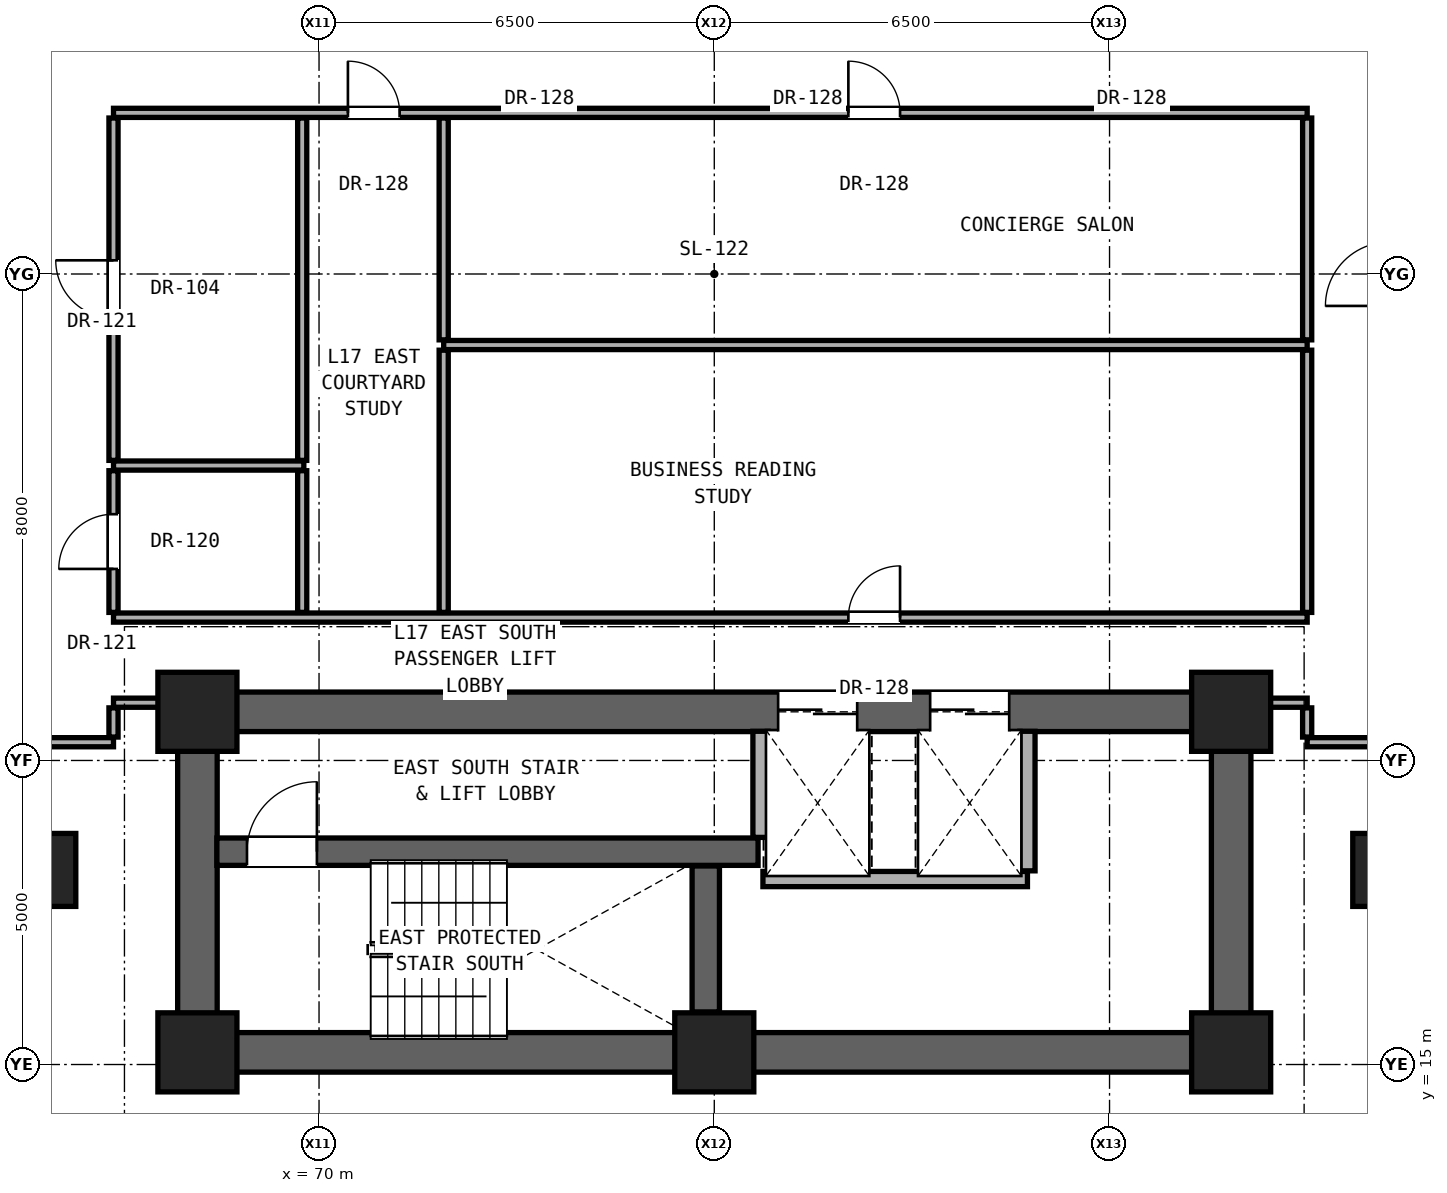
"""IFC4 building model, lengths in metres.
Left out: names, types, materials, properties, quantities, classifications, styles, units other than length and angle.
Written with IfcOpenShell. Run it as: python <this file> out.ifc"""

import sys

from ifc_helpers import new_model, si_unit, direction, frame, frame_2d, origin, origin_2d, place, context, subcontext, project, spatial, rectangle, extrude, element, fill, save


model = new_model("IFC4")
c1 = context("Model", 3, precision=1e-05, world=origin(), true_north=direction((0.0, 1.0)))
c2 = subcontext(c1, "Body", "Model", "MODEL_VIEW")
j1 = project(units=[si_unit("LENGTHUNIT", "METRE"), si_unit("PLANEANGLEUNIT", "RADIAN")], contexts=[c1])
p1 = place(None, origin())
s1 = spatial("IfcSite", under=j1, at=p1, CompositionType="ELEMENT")
p2 = place(p1, origin())
s2 = spatial("IfcBuilding", under=s1, at=p2, CompositionType="ELEMENT")
p3 = place(p2, frame((0.0, 0.0, 62.0)))
s3 = spatial("IfcBuildingStorey", under=s2, at=p3, CompositionType="ELEMENT", Elevation=62.0)
for number, where, z_axis, x_axis in (
    (1, (68.0, 15.2, 0.0), (0.0, 0.0, 1.0), (1.0, 0.0, 0.0)),
    (2, (76.5, 15.2, 0.0), (0.0, 0.0, 1.0), (1.0, 0.0, 0.0)),
    (3, (85.0, 15.2, 0.0), (0.0, 0.0, 1.0), (1.0, 0.0, 0.0)),
    (4, (68.0, 20.8, 0.0), (0.0, 0.0, 1.0), (1.0, 0.0, 0.0)),
    (5, (85.0, 20.8, 0.0), (0.0, 0.0, 1.0), (1.0, 0.0, 0.0)),
):
    element("IfcColumn", number, at=place(p3, frame(where, z_axis=z_axis, x_axis=x_axis)), inside=s3, PredefinedType="COLUMN", context=c2, shape_type="SweptSolid", body=[
        extrude(rectangle(XDim=1.3, YDim=1.3, at=origin_2d()), origin(), (0.0, 0.0, 1.0), 3.3),
    ])
for number, where, z_axis, x_axis in (
    (6, (65.6, 18.2, 0.0), (0.0, 0.0, 1.0), (1.0, 0.0, 0.0)),
    (7, (87.4, 18.2, 0.0), (0.0, 0.0, 1.0), (1.0, 0.0, 0.0)),
):
    element("IfcColumn", number, at=place(p3, frame(where, z_axis=z_axis, x_axis=x_axis)), inside=s3, PredefinedType="PILASTER", context=c2, shape_type="SweptSolid", body=[
        extrude(rectangle(XDim=0.8, YDim=1.2, at=origin_2d()), origin(), (0.0, 0.0, 1.0), 3.3),
    ])
p4 = place(p3, frame((68.0, 15.2, 0.0), z_axis=(0.0, 0.0, 1.0), x_axis=(1.0, 0.0, 0.0)))
e8 = element("IfcWall", 8, at=p4, inside=s3, PredefinedType="SHEAR", context=c2, shape_type="SweptSolid", body=[
    extrude(rectangle(XDim=17.0, YDim=0.65, at=frame_2d((8.5, 0.0))), origin(), (0.0, 0.0, 1.0), 3.06),
])
for number, where, z_axis, x_axis in (
    (9, (68.0, 15.2, 0.0), (0.0, 0.0, 1.0), (0.0, 1.0, 0.0)),
    (10, (85.0, 15.2, 0.0), (0.0, 0.0, 1.0), (0.0, 1.0, 0.0)),
):
    element("IfcWall", number, at=place(p3, frame(where, z_axis=z_axis, x_axis=x_axis)), inside=s3, PredefinedType="SHEAR", context=c2, shape_type="SweptSolid", body=[
        extrude(rectangle(XDim=5.6, YDim=0.65, at=frame_2d((2.8, 0.0))), origin(), (0.0, 0.0, 1.0), 3.06),
    ])
p5 = place(p3, frame((68.0, 20.8, 0.0), z_axis=(0.0, 0.0, 1.0), x_axis=(1.0, 0.0, 0.0)))
e11 = element("IfcWall", 11, at=p5, inside=s3, PredefinedType="SHEAR", context=c2, shape_type="SweptSolid", body=[
    extrude(rectangle(XDim=17.0, YDim=0.65, at=frame_2d((8.5, 0.0))), origin(), (0.0, 0.0, 1.0), 3.06),
])
p6 = place(p5, frame((9.55, 0.0, 0.0)))
e12 = element("IfcOpeningElement", 12, at=p6, cuts=e11, PredefinedType="OPENING", context=c2, shape_type="SweptSolid", body=[
    extrude(rectangle(XDim=1.3, YDim=2.3, at=frame_2d((0.65, 1.15))), frame((0.0, 0.335, 0.0), z_axis=(0.0, -1.0, 0.0), x_axis=(1.0, 0.0, 0.0)), (0.0, 0.0, 1.0), 0.67),
])
p7 = place(p5, frame((12.05, 0.0, 0.0)))
e13 = element("IfcOpeningElement", 13, at=p7, cuts=e11, PredefinedType="OPENING", context=c2, shape_type="SweptSolid", body=[
    extrude(rectangle(XDim=1.3, YDim=2.3, at=frame_2d((0.65, 1.15))), frame((0.0, 0.335, 0.0), z_axis=(0.0, -1.0, 0.0), x_axis=(1.0, 0.0, 0.0)), (0.0, 0.0, 1.0), 0.67),
])
p8 = place(p3, frame((77.3, 18.05, 0.0), z_axis=(0.0, 0.0, 1.0), x_axis=(1.0, 0.0, 0.0)))
e14 = element("IfcWall", 14, at=p8, inside=s3, PredefinedType="SOLIDWALL", context=c2, shape_type="SweptSolid", body=[
    extrude(rectangle(XDim=4.35, YDim=0.25, at=frame_2d((2.175, 0.0))), origin(), (0.0, 0.0, 1.0), 3.06),
])
p9 = place(p3, frame((68.32, 18.5, 0.0), z_axis=(0.0, 0.0, 1.0), x_axis=(1.0, 0.0, 0.0)))
e15 = element("IfcWall", 15, at=p9, inside=s3, PredefinedType="SHEAR", context=c2, shape_type="SweptSolid", body=[
    extrude(rectangle(XDim=8.9, YDim=0.45, at=frame_2d((4.45, 0.0))), origin(), (0.0, 0.0, 1.0), 3.06),
])
p10 = place(p9, frame((0.495, 0.0, 0.0)))
e16 = element("IfcOpeningElement", 16, at=p10, cuts=e15, PredefinedType="OPENING", context=c2, shape_type="SweptSolid", body=[
    extrude(rectangle(XDim=1.15, YDim=2.2, at=frame_2d((0.575, 1.1))), frame((0.0, 0.235, 0.0), z_axis=(0.0, -1.0, 0.0), x_axis=(1.0, 0.0, 0.0)), (0.0, 0.0, 1.0), 0.47),
])
p11 = place(p3, frame((65.25, 20.3, 0.0), z_axis=(0.0, 0.0, 1.0), x_axis=(1.0, 0.0, 0.0)))
e17 = element("IfcWall", 17, at=p11, inside=s3, PredefinedType="PARTITIONING", context=c2, shape_type="SweptSolid", body=[
    extrude(rectangle(XDim=1.37, YDim=0.15, at=frame_2d((0.685, 0.0))), origin(), (0.0, 0.0, 1.0), 3.06),
])
p12 = place(p3, frame((86.25, 20.3, 0.0), z_axis=(0.0, 0.0, 1.0), x_axis=(1.0, 0.0, 0.0)))
e18 = element("IfcWall", 18, at=p12, inside=s3, PredefinedType="PARTITIONING", context=c2, shape_type="SweptSolid", body=[
    extrude(rectangle(XDim=1.35, YDim=0.15, at=frame_2d((0.675, 0.0))), origin(), (0.0, 0.0, 1.0), 3.06),
])
p13 = place(p3, frame((66.62, 20.95, 0.0), z_axis=(0.0, 0.0, 1.0), x_axis=(1.0, 0.0, 0.0)))
e19 = element("IfcWall", 19, at=p13, inside=s3, PredefinedType="PARTITIONING", context=c2, shape_type="SweptSolid", body=[
    extrude(rectangle(XDim=1.06, YDim=0.15, at=frame_2d((0.53, 0.0))), origin(), (0.0, 0.0, 1.0), 2.452),
])
p14 = place(p3, frame((85.32, 20.95, 0.0), z_axis=(0.0, 0.0, 1.0), x_axis=(1.0, 0.0, 0.0)))
e20 = element("IfcWall", 20, at=p14, inside=s3, PredefinedType="PARTITIONING", context=c2, shape_type="SweptSolid", body=[
    extrude(rectangle(XDim=0.93, YDim=0.15, at=frame_2d((0.465, 0.0))), origin(), (0.0, 0.0, 1.0), 2.452),
])
p15 = place(p3, frame((66.62, 22.35, 0.0), z_axis=(0.0, 0.0, 1.0), x_axis=(1.0, 0.0, 0.0)))
e21 = element("IfcWall", 21, at=p15, inside=s3, PredefinedType="PARTITIONING", context=c2, shape_type="SweptSolid", body=[
    extrude(rectangle(XDim=19.63, YDim=0.15, at=frame_2d((9.815, 0.0))), origin(), (0.0, 0.0, 1.0), 2.125),
])
p16 = place(p15, frame((12.085, 0.0, 0.0)))
e22 = element("IfcOpeningElement", 22, at=p16, cuts=e21, PredefinedType="OPENING", context=c2, shape_type="SweptSolid", body=[
    extrude(rectangle(XDim=0.85, YDim=2.01, at=frame_2d((0.425, 1.005))), frame((0.0, 0.085, 0.0), z_axis=(0.0, -1.0, 0.0), x_axis=(1.0, 0.0, 0.0)), (0.0, 0.0, 1.0), 0.17),
])
p17 = place(p3, frame((66.62, 24.85, 0.0), z_axis=(0.0, 0.0, 1.0), x_axis=(1.0, 0.0, 0.0)))
e23 = element("IfcWall", 23, at=p17, inside=s3, PredefinedType="PARTITIONING", context=c2, shape_type="SweptSolid", body=[
    extrude(rectangle(XDim=3.13, YDim=0.15, at=frame_2d((1.565, 0.0))), origin(), (0.0, 0.0, 1.0), 2.125),
])
p18 = place(p3, frame((72.05, 26.832, 0.0), z_axis=(0.0, 0.0, 1.0), x_axis=(1.0, 0.0, 0.0)))
e24 = element("IfcWall", 24, at=p18, inside=s3, PredefinedType="PARTITIONING", context=c2, shape_type="SweptSolid", body=[
    extrude(rectangle(XDim=14.2, YDim=0.15, at=frame_2d((7.1, 0.0))), origin(), (0.0, 0.0, 1.0), 2.125),
])
p19 = place(p3, frame((66.62, 30.65, 0.0), z_axis=(0.0, 0.0, 1.0), x_axis=(1.0, 0.0, 0.0)))
e25 = element("IfcWall", 25, at=p19, inside=s3, PredefinedType="PARTITIONING", context=c2, shape_type="SweptSolid", body=[
    extrude(rectangle(XDim=19.63, YDim=0.15, at=frame_2d((9.815, 0.0))), origin(), (0.0, 0.0, 1.0), 2.125),
])
p20 = place(p19, frame((3.855, 0.0, 0.0)))
e26 = element("IfcOpeningElement", 26, at=p20, cuts=e25, PredefinedType="OPENING", context=c2, shape_type="SweptSolid", body=[
    extrude(rectangle(XDim=0.85, YDim=2.01, at=frame_2d((0.425, 1.005))), frame((0.0, 0.085, 0.0), z_axis=(0.0, -1.0, 0.0), x_axis=(1.0, 0.0, 0.0)), (0.0, 0.0, 1.0), 0.17),
])
p21 = place(p19, frame((12.085, 0.0, 0.0)))
e27 = element("IfcOpeningElement", 27, at=p21, cuts=e25, PredefinedType="OPENING", context=c2, shape_type="SweptSolid", body=[
    extrude(rectangle(XDim=0.85, YDim=2.01, at=frame_2d((0.425, 1.005))), frame((0.0, 0.085, 0.0), z_axis=(0.0, -1.0, 0.0), x_axis=(1.0, 0.0, 0.0)), (0.0, 0.0, 1.0), 0.17),
])
p22 = place(p3, frame((66.62, 20.385, 0.0), z_axis=(0.0, 0.0, 1.0), x_axis=(0.0, 1.0, 0.0)))
e28 = element("IfcWall", 28, at=p22, inside=s3, PredefinedType="PARTITIONING", context=c2, shape_type="SweptSolid", body=[
    extrude(rectangle(XDim=0.48, YDim=0.15, at=frame_2d((0.24, 0.0))), origin(), (0.0, 0.0, 1.0), 2.452),
])
p23 = place(p3, frame((66.62, 22.435, 0.0), z_axis=(0.0, 0.0, 1.0), x_axis=(0.0, 1.0, 0.0)))
e29 = element("IfcWall", 29, at=p23, inside=s3, PredefinedType="PARTITIONING", context=c2, shape_type="SweptSolid", body=[
    extrude(rectangle(XDim=2.33, YDim=0.15, at=frame_2d((1.165, 0.0))), origin(), (0.0, 0.0, 1.0), 3.06),
])
p24 = place(p23, frame((0.715, 0.0, 0.0)))
e30 = element("IfcOpeningElement", 30, at=p24, cuts=e29, PredefinedType="OPENING", context=c2, shape_type="SweptSolid", body=[
    extrude(rectangle(XDim=0.9, YDim=2.1, at=frame_2d((0.45, 1.05))), frame((0.0, 0.085, 0.0), z_axis=(0.0, -1.0, 0.0), x_axis=(1.0, 0.0, 0.0)), (0.0, 0.0, 1.0), 0.17),
])
p25 = place(p3, frame((66.62, 24.935, 0.0), z_axis=(0.0, 0.0, 1.0), x_axis=(0.0, 1.0, 0.0)))
e31 = element("IfcWall", 31, at=p25, inside=s3, PredefinedType="PARTITIONING", context=c2, shape_type="SweptSolid", body=[
    extrude(rectangle(XDim=5.63, YDim=0.15, at=frame_2d((2.815, 0.0))), origin(), (0.0, 0.0, 1.0), 2.279),
])
p26 = place(p25, frame((2.34, 0.0, 0.0)))
e32 = element("IfcOpeningElement", 32, at=p26, cuts=e31, PredefinedType="OPENING", context=c2, shape_type="SweptSolid", body=[
    extrude(rectangle(XDim=0.95, YDim=2.15, at=frame_2d((0.475, 1.075))), frame((0.0, 0.085, 0.0), z_axis=(0.0, -1.0, 0.0), x_axis=(1.0, 0.0, 0.0)), (0.0, 0.0, 1.0), 0.17),
])
p27 = place(p3, frame((69.723, 22.435, 0.0), z_axis=(0.0, 0.0, 1.0), x_axis=(0.0, 1.0, 0.0)))
e33 = element("IfcWall", 33, at=p27, inside=s3, PredefinedType="PARTITIONING", context=c2, shape_type="SweptSolid", body=[
    extrude(rectangle(XDim=2.33, YDim=0.15, at=frame_2d((1.165, 0.0))), origin(), (0.0, 0.0, 1.0), 3.06),
])
p28 = place(p3, frame((69.723, 24.935, 0.0), z_axis=(0.0, 0.0, 1.0), x_axis=(0.0, 1.0, 0.0)))
e34 = element("IfcWall", 34, at=p28, inside=s3, PredefinedType="PARTITIONING", context=c2, shape_type="SweptSolid", body=[
    extrude(rectangle(XDim=5.63, YDim=0.15, at=frame_2d((2.815, 0.0))), origin(), (0.0, 0.0, 1.0), 2.125),
])
p29 = place(p3, frame((72.05, 22.435, 0.0), z_axis=(0.0, 0.0, 1.0), x_axis=(0.0, 1.0, 0.0)))
e35 = element("IfcWall", 35, at=p29, inside=s3, PredefinedType="PARTITIONING", context=c2, shape_type="SweptSolid", body=[
    extrude(rectangle(XDim=4.312, YDim=0.15, at=frame_2d((2.156, 0.0))), origin(), (0.0, 0.0, 1.0), 2.589),
])
p30 = place(p3, frame((72.05, 26.917, 0.0), z_axis=(0.0, 0.0, 1.0), x_axis=(0.0, 1.0, 0.0)))
e36 = element("IfcWall", 36, at=p30, inside=s3, PredefinedType="PARTITIONING", context=c2, shape_type="SweptSolid", body=[
    extrude(rectangle(XDim=3.648, YDim=0.15, at=frame_2d((1.824, 0.0))), origin(), (0.0, 0.0, 1.0), 2.125),
])
p31 = place(p3, frame((76.36, 15.865, 0.0), z_axis=(0.0, 0.0, 1.0), x_axis=(0.0, 1.0, 0.0)))
e37 = element("IfcWall", 37, at=p31, inside=s3, PredefinedType="SHEAR", context=c2, shape_type="SweptSolid", body=[
    extrude(rectangle(XDim=2.4, YDim=0.45, at=frame_2d((1.2, 0.0))), origin(), (0.0, 0.0, 1.0), 3.06),
])
p32 = place(p3, frame((77.26, 18.735, 0.0), z_axis=(0.0, 0.0, 1.0), x_axis=(0.0, 1.0, 0.0)))
e38 = element("IfcWall", 38, at=p32, inside=s3, PredefinedType="SOLIDWALL", context=c2, shape_type="SweptSolid", body=[
    extrude(rectangle(XDim=1.745, YDim=0.25, at=frame_2d((0.873, 0.0))), origin(), (0.0, 0.0, 1.0), 3.06),
])
p33 = place(p3, frame((81.65, 18.185, 0.0), z_axis=(0.0, 0.0, 1.0), x_axis=(0.0, 1.0, 0.0)))
e39 = element("IfcWall", 39, at=p33, inside=s3, PredefinedType="SOLIDWALL", context=c2, shape_type="SweptSolid", body=[
    extrude(rectangle(XDim=2.295, YDim=0.25, at=frame_2d((1.147, 0.0))), origin(), (0.0, 0.0, 1.0), 3.06),
])
p34 = place(p3, frame((86.25, 20.385, 0.0), z_axis=(0.0, 0.0, 1.0), x_axis=(0.0, 1.0, 0.0)))
e40 = element("IfcWall", 40, at=p34, inside=s3, PredefinedType="PARTITIONING", context=c2, shape_type="SweptSolid", body=[
    extrude(rectangle(XDim=0.48, YDim=0.15, at=frame_2d((0.24, 0.0))), origin(), (0.0, 0.0, 1.0), 2.452),
])
p35 = place(p3, frame((86.25, 22.435, 0.0), z_axis=(0.0, 0.0, 1.0), x_axis=(0.0, 1.0, 0.0)))
e41 = element("IfcWall", 41, at=p35, inside=s3, PredefinedType="PARTITIONING", context=c2, shape_type="SweptSolid", body=[
    extrude(rectangle(XDim=4.312, YDim=0.15, at=frame_2d((2.156, 0.0))), origin(), (0.0, 0.0, 1.0), 3.06),
])
p36 = place(p3, frame((86.25, 26.917, 0.0), z_axis=(0.0, 0.0, 1.0), x_axis=(0.0, 1.0, 0.0)))
e42 = element("IfcWall", 42, at=p36, inside=s3, PredefinedType="PARTITIONING", context=c2, shape_type="SweptSolid", body=[
    extrude(rectangle(XDim=3.648, YDim=0.15, at=frame_2d((1.824, 0.0))), origin(), (0.0, 0.0, 1.0), 2.279),
])
p37 = place(p10, origin())
e43 = element("IfcDoor", 43, at=p37, inside=s3, OperationType="SINGLE_SWING_RIGHT", PredefinedType="DOOR", context=c2, shape_type="SweptSolid", body=[
    extrude(rectangle(XDim=1.15, YDim=2.2, at=frame_2d((0.575, 1.1))), frame((0.0, 0.025, 0.0), z_axis=(0.0, -1.0, 0.0), x_axis=(1.0, 0.0, 0.0)), (0.0, 0.0, 1.0), 0.05),
])
fill(e16, e43)
p38 = place(p24, origin())
e44 = element("IfcDoor", 44, at=p38, inside=s3, OperationType="SINGLE_SWING_LEFT", PredefinedType="DOOR", context=c2, shape_type="SweptSolid", body=[
    extrude(rectangle(XDim=0.9, YDim=2.1, at=frame_2d((0.45, 1.05))), frame((0.0, 0.025, 0.0), z_axis=(0.0, -1.0, 0.0), x_axis=(1.0, 0.0, 0.0)), (0.0, 0.0, 1.0), 0.05),
])
fill(e30, e44)
p39 = place(p26, origin())
e45 = element("IfcDoor", 45, at=p39, inside=s3, OperationType="SINGLE_SWING_RIGHT", PredefinedType="DOOR", context=c2, shape_type="SweptSolid", body=[
    extrude(rectangle(XDim=0.95, YDim=2.15, at=frame_2d((0.475, 1.075))), frame((0.0, 0.025, 0.0), z_axis=(0.0, -1.0, 0.0), x_axis=(1.0, 0.0, 0.0)), (0.0, 0.0, 1.0), 0.05),
])
fill(e32, e45)
p40 = place(p20, origin())
e46 = element("IfcDoor", 46, at=p40, inside=s3, OperationType="SINGLE_SWING_LEFT", PredefinedType="DOOR", context=c2, shape_type="SweptSolid", body=[
    extrude(rectangle(XDim=0.85, YDim=2.01, at=frame_2d((0.425, 1.005))), frame((0.0, 0.025, 0.0), z_axis=(0.0, -1.0, 0.0), x_axis=(1.0, 0.0, 0.0)), (0.0, 0.0, 1.0), 0.05),
])
fill(e26, e46)
p41 = place(p16, origin())
e47 = element("IfcDoor", 47, at=p41, inside=s3, OperationType="SINGLE_SWING_RIGHT", PredefinedType="DOOR", context=c2, shape_type="SweptSolid", body=[
    extrude(rectangle(XDim=0.85, YDim=2.01, at=frame_2d((0.425, 1.005))), frame((0.0, 0.025, 0.0), z_axis=(0.0, -1.0, 0.0), x_axis=(1.0, 0.0, 0.0)), (0.0, 0.0, 1.0), 0.05),
])
fill(e22, e47)
p42 = place(p21, origin())
e48 = element("IfcDoor", 48, at=p42, inside=s3, OperationType="SINGLE_SWING_LEFT", PredefinedType="DOOR", context=c2, shape_type="SweptSolid", body=[
    extrude(rectangle(XDim=0.85, YDim=2.01, at=frame_2d((0.425, 1.005))), frame((0.0, 0.025, 0.0), z_axis=(0.0, -1.0, 0.0), x_axis=(1.0, 0.0, 0.0)), (0.0, 0.0, 1.0), 0.05),
])
fill(e27, e48)
p43 = place(p6, origin())
e49 = element("IfcDoor", 49, at=p43, inside=s3, OperationType="DOUBLE_DOOR_SLIDING", PredefinedType="DOOR", context=c2, shape_type="SweptSolid", body=[
    extrude(rectangle(XDim=1.3, YDim=2.3, at=frame_2d((0.65, 1.15))), frame((0.0, 0.025, 0.0), z_axis=(0.0, -1.0, 0.0), x_axis=(1.0, 0.0, 0.0)), (0.0, 0.0, 1.0), 0.05),
])
fill(e12, e49)
p44 = place(p7, origin())
e50 = element("IfcDoor", 50, at=p44, inside=s3, OperationType="DOUBLE_DOOR_SLIDING", PredefinedType="DOOR", context=c2, shape_type="SweptSolid", body=[
    extrude(rectangle(XDim=1.3, YDim=2.3, at=frame_2d((0.65, 1.15))), frame((0.0, 0.025, 0.0), z_axis=(0.0, -1.0, 0.0), x_axis=(1.0, 0.0, 0.0)), (0.0, 0.0, 1.0), 0.05),
])
fill(e13, e50)
save(model, sys.argv[1])
